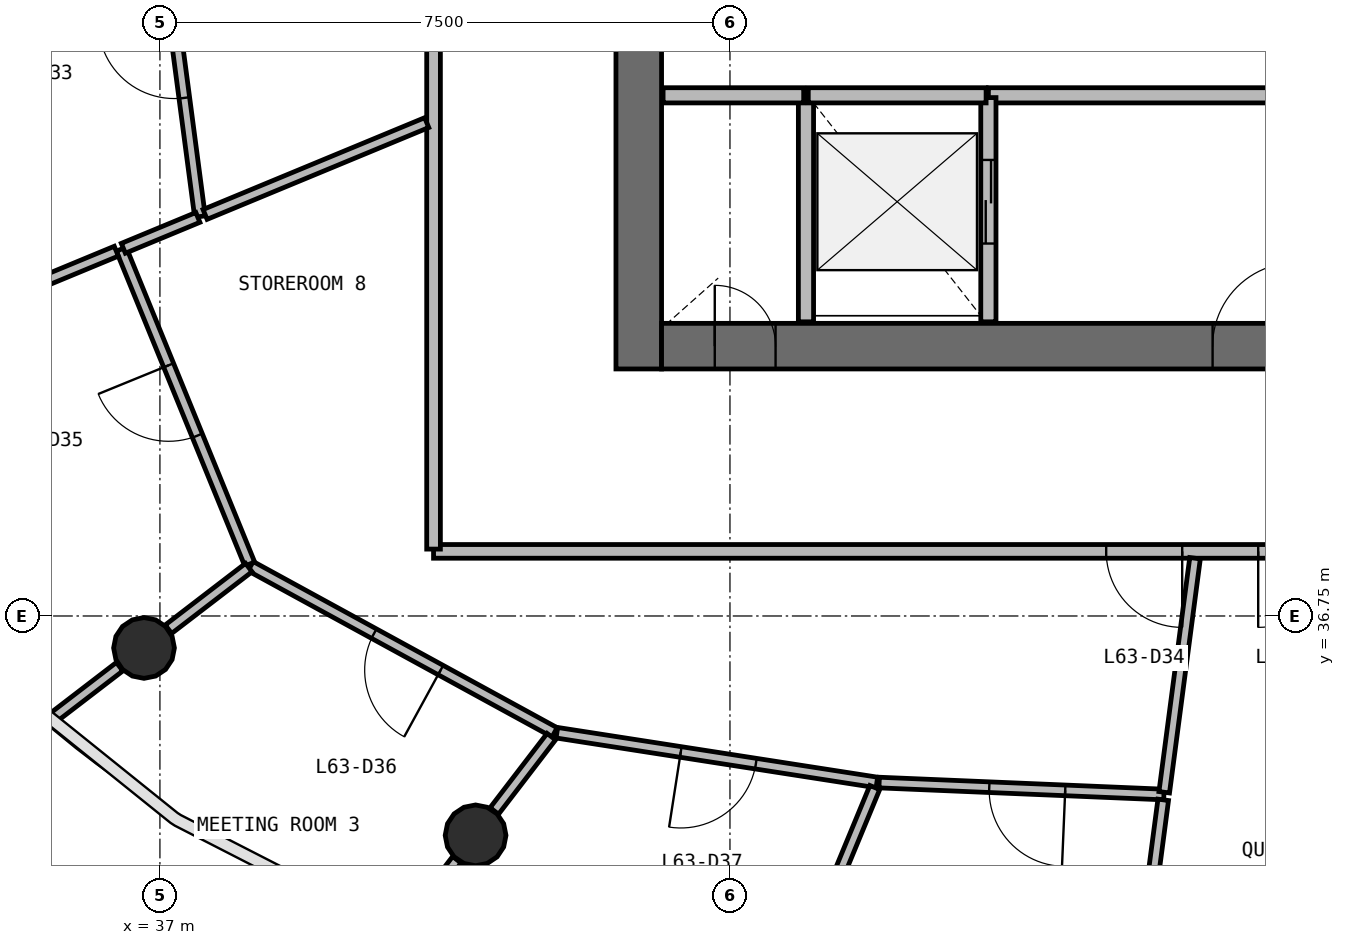
"""IFC4 building model, lengths in metres.
Left out: names, types, materials, properties, quantities, classifications, styles, units other than length and angle.
Written with IfcOpenShell. Run it as: python <this file> out.ifc"""

import sys

from ifc_helpers import new_model, si_unit, direction, frame, frame_2d, origin, origin_2d, place, context, subcontext, project, spatial, rectangle, circle, extrude, source, transform, mapped, element, fill, save


model = new_model("IFC4")
c1 = context("Model", 3, precision=1e-05, world=origin(), true_north=direction((0.0, 1.0)))
c2 = subcontext(c1, "Body", "Model", "MODEL_VIEW")
j1 = project(units=[si_unit("LENGTHUNIT", "METRE"), si_unit("PLANEANGLEUNIT", "RADIAN")], contexts=[c1])
p1 = place(None, origin())
s1 = spatial("IfcSite", under=j1, at=p1, CompositionType="ELEMENT")
p2 = place(p1, origin())
s2 = spatial("IfcBuilding", under=s1, at=p2, CompositionType="ELEMENT")
p3 = place(p2, frame((0.0, 0.0, 257.9)))
s3 = spatial("IfcBuildingStorey", under=s2, at=p3, CompositionType="ELEMENT", Elevation=257.9)
p4 = place(p3, frame((43.3, 56.0, 0.0), z_axis=(0.0, 0.0, 1.0), x_axis=(0.0, -1.0, 0.0)))
e1 = element("IfcWall", 1, at=p4, inside=s3, PredefinedType="SHEAR", context=c2, shape_type="SweptSolid", body=[
    extrude(rectangle(XDim=16.0, YDim=0.6, at=frame_2d((8.0, 0.0))), origin(), (0.0, 0.0, 1.0), 3.9),
])
p5 = place(p4, frame((7.1, 0.0, 0.0)))
e2 = element("IfcOpeningElement", 2, at=p5, cuts=e1, PredefinedType="OPENING", context=c2, shape_type="SweptSolid", body=[
    extrude(rectangle(XDim=1.8, YDim=2.1, at=frame_2d((0.9, 1.05))), frame((0.0, 0.31, 0.0), z_axis=(0.0, -1.0, 0.0), x_axis=(1.0, 0.0, 0.0)), (0.0, 0.0, 1.0), 0.62),
])
p6 = place(p3, frame((43.6, 40.3, 0.0), z_axis=(0.0, 0.0, 1.0), x_axis=(1.0, 0.0, 0.0)))
e3 = element("IfcWall", 3, at=p6, inside=s3, PredefinedType="SHEAR", context=c2, shape_type="SweptSolid", body=[
    extrude(rectangle(XDim=16.8, YDim=0.6, at=frame_2d((8.4, 0.0))), origin(), (0.0, 0.0, 1.0), 3.9),
])
p7 = place(p6, frame((10.3, 0.0, 0.0)))
e4 = element("IfcOpeningElement", 4, at=p7, cuts=e3, PredefinedType="OPENING", context=c2, shape_type="SweptSolid", body=[
    extrude(rectangle(XDim=1.2, YDim=2.1, at=frame_2d((0.6, 1.05))), frame((0.0, 0.31, 0.0), z_axis=(0.0, -1.0, 0.0), x_axis=(1.0, 0.0, 0.0)), (0.0, 0.0, 1.0), 0.62),
])
p8 = place(p6, frame((7.25, 0.0, 0.0)))
e5 = element("IfcOpeningElement", 5, at=p8, cuts=e3, PredefinedType="OPENING", context=c2, shape_type="SweptSolid", body=[
    extrude(rectangle(XDim=1.1, YDim=2.1, at=frame_2d((0.55, 1.05))), frame((0.0, 0.31, 0.0), z_axis=(0.0, -1.0, 0.0), x_axis=(1.0, 0.0, 0.0)), (0.0, 0.0, 1.0), 0.62),
])
p9 = place(p6, frame((0.7, 0.0, 0.0)))
e6 = element("IfcOpeningElement", 6, at=p9, cuts=e3, PredefinedType="OPENING", context=c2, shape_type="SweptSolid", body=[
    extrude(rectangle(XDim=0.8, YDim=2.1, at=frame_2d((0.4, 1.05))), frame((0.0, 0.31, 0.0), z_axis=(0.0, -1.0, 0.0), x_axis=(1.0, 0.0, 0.0)), (0.0, 0.0, 1.0), 0.62),
])
m1 = source(origin(), c2, "Body", "SweptSolid", [
    extrude(circle(Radius=0.4, at=origin_2d()), origin(), (0.0, 0.0, 1.0), 3.9),
])
for number, where, z_axis, x_axis in (
    (7, (36.791, 36.329, 0.0), (0.0, 0.0, 1.0), (1.0, 0.0, 0.0)),
    (8, (41.153, 33.864, 0.0), (0.0, 0.0, 1.0), (1.0, 0.0, 0.0)),
):
    element("IfcColumn", number, at=place(p3, frame(where, z_axis=z_axis, x_axis=x_axis)), inside=s3, PredefinedType="COLUMN", context=c2, shape_type="MappedRepresentation", body=[
        mapped(m1, transform((0.0, 0.0, 0.0), scale=1.0)),
    ])
p10 = place(p3, frame((52.7, 43.6, 0.0), z_axis=(0.0, 0.0, 1.0), x_axis=(-1.0, 0.0, 0.0)))
e9 = element("IfcWall", 9, at=p10, inside=s3, PredefinedType="SOLIDWALL", context=c2, shape_type="SweptSolid", body=[
    extrude(rectangle(XDim=4.8, YDim=0.2, at=frame_2d((2.4, 0.0))), origin(), (0.0, 0.0, 1.0), 3.58),
])
p11 = place(p3, frame((45.5, 43.6, 0.0), z_axis=(0.0, 0.0, 1.0), x_axis=(0.0, -1.0, 0.0)))
e10 = element("IfcWall", 10, at=p11, inside=s3, PredefinedType="SOLIDWALL", context=c2, shape_type="SweptSolid", body=[
    extrude(rectangle(XDim=2.98, YDim=0.2, at=frame_2d((1.49, 0.0))), origin(), (0.0, 0.0, 1.0), 3.58),
])
p12 = place(p3, frame((47.9, 40.62, 0.0), z_axis=(0.0, 0.0, 1.0), x_axis=(0.0, 1.0, 0.0)))
e11 = element("IfcWall", 11, at=p12, inside=s3, PredefinedType="SOLIDWALL", context=c2, shape_type="SweptSolid", body=[
    extrude(rectangle(XDim=2.95, YDim=0.2, at=frame_2d((1.475, 0.0))), origin(), (0.0, 0.0, 1.0), 3.58),
])
p13 = place(p12, frame((1.03, 0.0, 0.0)))
e12 = element("IfcOpeningElement", 12, at=p13, cuts=e11, PredefinedType="OPENING", context=c2, shape_type="SweptSolid", body=[
    extrude(rectangle(XDim=1.1, YDim=2.1, at=frame_2d((0.55, 1.05))), frame((0.0, 0.11, 0.0), z_axis=(0.0, -1.0, 0.0), x_axis=(1.0, 0.0, 0.0)), (0.0, 0.0, 1.0), 0.22),
])
p14 = place(p3, frame((47.87, 43.6, 0.0), z_axis=(0.0, 0.0, 1.0), x_axis=(-1.0, 0.0, 0.0)))
e13 = element("IfcWall", 13, at=p14, inside=s3, PredefinedType="SOLIDWALL", context=c2, shape_type="SweptSolid", body=[
    extrude(rectangle(XDim=2.34, YDim=0.2, at=frame_2d((1.17, 0.0))), origin(), (0.0, 0.0, 1.0), 3.58),
])
p15 = place(p3, frame((45.47, 43.6, 0.0), z_axis=(0.0, 0.0, 1.0), x_axis=(-1.0, 0.0, 0.0)))
e14 = element("IfcWall", 14, at=p15, inside=s3, PredefinedType="SOLIDWALL", context=c2, shape_type="SweptSolid", body=[
    extrude(rectangle(XDim=1.85, YDim=0.2, at=frame_2d((0.925, 0.0))), origin(), (0.0, 0.0, 1.0), 3.58),
])
p16 = place(p3, frame((63.4, 37.6, 0.0), z_axis=(0.0, 0.0, 1.0), x_axis=(-1.0, 0.0, 0.0)))
e15 = element("IfcWall", 15, at=p16, inside=s3, PredefinedType="PARTITIONING", context=c2, shape_type="SweptSolid", body=[
    extrude(rectangle(XDim=22.8, YDim=0.18, at=frame_2d((11.4, 0.0))), origin(), (0.0, 0.0, 1.0), 2.88),
])
p17 = place(p16, frame((12.95, 0.0, 0.0)))
e16 = element("IfcOpeningElement", 16, at=p17, cuts=e15, PredefinedType="OPENING", context=c2, shape_type="SweptSolid", body=[
    extrude(rectangle(XDim=1.0, YDim=2.1, at=frame_2d((0.5, 1.05))), frame((0.0, 0.1, 0.0), z_axis=(0.0, -1.0, 0.0), x_axis=(1.0, 0.0, 0.0)), (0.0, 0.0, 1.0), 0.2),
])
p18 = place(p16, frame((10.95, 0.0, 0.0)))
e17 = element("IfcOpeningElement", 17, at=p18, cuts=e15, PredefinedType="OPENING", context=c2, shape_type="SweptSolid", body=[
    extrude(rectangle(XDim=1.0, YDim=2.1, at=frame_2d((0.5, 1.05))), frame((0.0, 0.1, 0.0), z_axis=(0.0, -1.0, 0.0), x_axis=(1.0, 0.0, 0.0)), (0.0, 0.0, 1.0), 0.2),
])
p19 = place(p16, frame((8.75, 0.0, 0.0)))
e18 = element("IfcOpeningElement", 18, at=p19, cuts=e15, PredefinedType="OPENING", context=c2, shape_type="SweptSolid", body=[
    extrude(rectangle(XDim=1.0, YDim=2.1, at=frame_2d((0.5, 1.05))), frame((0.0, 0.1, 0.0), z_axis=(0.0, -1.0, 0.0), x_axis=(1.0, 0.0, 0.0)), (0.0, 0.0, 1.0), 0.2),
])
p20 = place(p3, frame((40.6, 37.63, 0.0), z_axis=(0.0, 0.0, 1.0), x_axis=(0.0, 1.0, 0.0)))
e19 = element("IfcWall", 19, at=p20, inside=s3, PredefinedType="PARTITIONING", context=c2, shape_type="SweptSolid", body=[
    extrude(rectangle(XDim=20.74, YDim=0.18, at=frame_2d((10.37, 0.0))), origin(), (0.0, 0.0, 1.0), 2.88),
])
p21 = place(p20, frame((12.09, 0.0, 0.0)))
e20 = element("IfcOpeningElement", 20, at=p21, cuts=e19, PredefinedType="OPENING", context=c2, shape_type="SweptSolid", body=[
    extrude(rectangle(XDim=1.0, YDim=2.1, at=frame_2d((0.5, 1.05))), frame((0.0, 0.1, 0.0), z_axis=(0.0, -1.0, 0.0), x_axis=(1.0, 0.0, 0.0)), (0.0, 0.0, 1.0), 0.2),
])
p22 = place(p20, frame((9.89, 0.0, 0.0)))
e21 = element("IfcOpeningElement", 21, at=p22, cuts=e19, PredefinedType="OPENING", context=c2, shape_type="SweptSolid", body=[
    extrude(rectangle(XDim=1.0, YDim=2.1, at=frame_2d((0.5, 1.05))), frame((0.0, 0.1, 0.0), z_axis=(0.0, -1.0, 0.0), x_axis=(1.0, 0.0, 0.0)), (0.0, 0.0, 1.0), 0.2),
])
p23 = place(p3, frame((42.193, 35.219, 0.0), z_axis=(0.0, 0.0, 1.0), x_axis=(-0.877448984614, 0.479669969249, 0.0)))
e22 = element("IfcWall", 22, at=p23, inside=s3, PredefinedType="PARTITIONING", context=c2, shape_type="SweptSolid", body=[
    extrude(rectangle(XDim=4.558, YDim=0.14, at=frame_2d((2.279, 0.0))), origin(), (0.0, 0.0, 1.0), 2.88),
])
p24 = place(p23, frame((1.708, 0.0, 0.0)))
e23 = element("IfcOpeningElement", 23, at=p24, cuts=e22, PredefinedType="OPENING", context=c2, shape_type="SweptSolid", body=[
    extrude(rectangle(XDim=1.0, YDim=2.1, at=frame_2d((0.5, 1.05))), frame((0.0, 0.08, 0.0), z_axis=(0.0, -1.0, 0.0), x_axis=(1.0, 0.0, 0.0)), (0.0, 0.0, 1.0), 0.16),
])
p25 = place(p3, frame((38.182, 37.433, 0.0), z_axis=(0.0, 0.0, 1.0), x_axis=(-0.377844499275, 0.925869069776, 0.0)))
e24 = element("IfcWall", 24, at=p25, inside=s3, PredefinedType="PARTITIONING", context=c2, shape_type="SweptSolid", body=[
    extrude(rectangle(XDim=4.475, YDim=0.14, at=frame_2d((2.237, 0.0))), origin(), (0.0, 0.0, 1.0), 2.88),
])
p26 = place(p25, frame((1.824, 0.0, 0.0)))
e25 = element("IfcOpeningElement", 25, at=p26, cuts=e24, PredefinedType="OPENING", context=c2, shape_type="SweptSolid", body=[
    extrude(rectangle(XDim=1.0, YDim=2.1, at=frame_2d((0.5, 1.05))), frame((0.0, 0.08, 0.0), z_axis=(0.0, -1.0, 0.0), x_axis=(1.0, 0.0, 0.0)), (0.0, 0.0, 1.0), 0.16),
])
p27 = place(p3, frame((46.433, 34.56, 0.0), z_axis=(0.0, 0.0, 1.0), x_axis=(-0.988131354716, 0.153611281572, 0.0)))
e26 = element("IfcWall", 26, at=p27, inside=s3, PredefinedType="PARTITIONING", context=c2, shape_type="SweptSolid", body=[
    extrude(rectangle(XDim=4.261, YDim=0.14, at=frame_2d((2.13, 0.0))), origin(), (0.0, 0.0, 1.0), 2.88),
])
p28 = place(p27, frame((1.611, 0.0, 0.0)))
e27 = element("IfcOpeningElement", 27, at=p28, cuts=e26, PredefinedType="OPENING", context=c2, shape_type="SweptSolid", body=[
    extrude(rectangle(XDim=1.0, YDim=2.1, at=frame_2d((0.5, 1.05))), frame((0.0, 0.08, 0.0), z_axis=(0.0, -1.0, 0.0), x_axis=(1.0, 0.0, 0.0)), (0.0, 0.0, 1.0), 0.16),
])
p29 = place(p3, frame((37.527, 42.005, 0.0), z_axis=(0.0, 0.0, 1.0), x_axis=(-0.130975494037, 0.99138560609, 0.0)))
e28 = element("IfcWall", 28, at=p29, inside=s3, PredefinedType="PARTITIONING", context=c2, shape_type="SweptSolid", body=[
    extrude(rectangle(XDim=4.024, YDim=0.14, at=frame_2d((2.012, 0.0))), origin(), (0.0, 0.0, 1.0), 2.88),
])
p30 = place(p29, frame((1.574, 0.0, 0.0)))
e29 = element("IfcOpeningElement", 29, at=p30, cuts=e28, PredefinedType="OPENING", context=c2, shape_type="SweptSolid", body=[
    extrude(rectangle(XDim=1.0, YDim=2.1, at=frame_2d((0.5, 1.05))), frame((0.0, 0.08, 0.0), z_axis=(0.0, -1.0, 0.0), x_axis=(1.0, 0.0, 0.0)), (0.0, 0.0, 1.0), 0.16),
])
p31 = place(p3, frame((50.21, 34.401, 0.0), z_axis=(0.0, 0.0, 1.0), x_axis=(-0.999118002039, 0.041990689471, 0.0)))
e30 = element("IfcWall", 30, at=p31, inside=s3, PredefinedType="PARTITIONING", context=c2, shape_type="SweptSolid", body=[
    extrude(rectangle(XDim=3.75, YDim=0.14, at=frame_2d((1.875, 0.0))), origin(), (0.0, 0.0, 1.0), 2.88),
])
p32 = place(p31, frame((1.3, 0.0, 0.0)))
e31 = element("IfcOpeningElement", 31, at=p32, cuts=e30, PredefinedType="OPENING", context=c2, shape_type="SweptSolid", body=[
    extrude(rectangle(XDim=1.0, YDim=2.1, at=frame_2d((0.5, 1.05))), frame((0.0, 0.08, 0.0), z_axis=(0.0, -1.0, 0.0), x_axis=(1.0, 0.0, 0.0)), (0.0, 0.0, 1.0), 0.16),
])
p33 = place(p3, frame((40.51, 43.241, 0.0), z_axis=(0.0, 0.0, 1.0), x_axis=(-0.923862215035, -0.382725237776, 0.0)))
e32 = element("IfcWall", 32, at=p33, inside=s3, PredefinedType="PARTITIONING", context=c2, shape_type="SweptSolid", body=[
    extrude(rectangle(XDim=3.156, YDim=0.14, at=frame_2d((1.578, 0.0))), origin(), (0.0, 0.0, 1.0), 2.88),
])
p34 = place(p3, frame((50.619, 37.51, 0.0), z_axis=(0.0, 0.0, 1.0), x_axis=(-0.130495182838, -0.991448943343, 0.0)))
e33 = element("IfcWall", 33, at=p34, inside=s3, PredefinedType="PARTITIONING", context=c2, shape_type="SweptSolid", body=[
    extrude(rectangle(XDim=3.106, YDim=0.14, at=frame_2d((1.553, 0.0))), origin(), (0.0, 0.0, 1.0), 2.88),
])
p35 = place(p3, frame((36.426, 41.549, 0.0), z_axis=(0.0, 0.0, 1.0), x_axis=(-0.923867061942, -0.382713537595, 0.0)))
e34 = element("IfcWall", 34, at=p35, inside=s3, PredefinedType="PARTITIONING", context=c2, shape_type="SweptSolid", body=[
    extrude(rectangle(XDim=3.0, YDim=0.14, at=frame_2d((1.5, 0.0))), origin(), (0.0, 0.0, 1.0), 2.88),
])
p36 = place(p3, frame((50.2, 34.331, 0.0), z_axis=(0.0, 0.0, 1.0), x_axis=(-0.13054119413, -0.991442886219, 0.0)))
e35 = element("IfcWall", 35, at=p36, inside=s3, PredefinedType="PARTITIONING", context=c2, shape_type="SweptSolid", body=[
    extrude(rectangle(XDim=1.676, YDim=0.14, at=frame_2d((0.838, 0.0))), origin(), (0.0, 0.0, 1.0), 2.88),
])
p37 = place(p3, frame((46.405, 34.493, 0.0), z_axis=(0.0, 0.0, 1.0), x_axis=(-0.382705531501, -0.92387037844, 0.0)))
e36 = element("IfcWall", 36, at=p37, inside=s3, PredefinedType="PARTITIONING", context=c2, shape_type="SweptSolid", body=[
    extrude(rectangle(XDim=1.625, YDim=0.14, at=frame_2d((0.813, 0.0))), origin(), (0.0, 0.0, 1.0), 2.88),
])
p38 = place(p3, frame((38.169, 37.387, 0.0), z_axis=(0.0, 0.0, 1.0), x_axis=(-0.793358692504, -0.608754453805, 0.0)))
e37 = element("IfcWall", 37, at=p38, inside=s3, PredefinedType="PARTITIONING", context=c2, shape_type="SweptSolid", body=[
    extrude(rectangle(XDim=1.333, YDim=0.14, at=frame_2d((0.667, 0.0))), origin(), (0.0, 0.0, 1.0), 2.88),
])
p39 = place(p3, frame((42.15, 35.163, 0.0), z_axis=(0.0, 0.0, 1.0), x_axis=(-0.608839083006, -0.793293748245, 0.0)))
e38 = element("IfcWall", 38, at=p39, inside=s3, PredefinedType="PARTITIONING", context=c2, shape_type="SweptSolid", body=[
    extrude(rectangle(XDim=1.232, YDim=0.14, at=frame_2d((0.616, 0.0))), origin(), (0.0, 0.0, 1.0), 2.88),
])
p40 = place(p3, frame((40.907, 33.543, 0.0), z_axis=(0.0, 0.0, 1.0), x_axis=(-0.60864680101, -0.793441284293, 0.0)))
e39 = element("IfcWall", 39, at=p40, inside=s3, PredefinedType="PARTITIONING", context=c2, shape_type="SweptSolid", body=[
    extrude(rectangle(XDim=1.143, YDim=0.14, at=frame_2d((0.571, 0.0))), origin(), (0.0, 0.0, 1.0), 2.88),
])
p41 = place(p3, frame((37.499, 41.994, 0.0), z_axis=(0.0, 0.0, 1.0), x_axis=(-0.923837370253, -0.382785205205, 0.0)))
e40 = element("IfcWall", 40, at=p41, inside=s3, PredefinedType="PARTITIONING", context=c2, shape_type="SweptSolid", body=[
    extrude(rectangle(XDim=1.061, YDim=0.14, at=frame_2d((0.531, 0.0))), origin(), (0.0, 0.0, 1.0), 2.88),
])
p42 = place(p3, frame((36.469, 36.083, 0.0), z_axis=(0.0, 0.0, 1.0), x_axis=(-0.793297066138, -0.608834759895, 0.0)))
e41 = element("IfcWall", 41, at=p42, inside=s3, PredefinedType="PARTITIONING", context=c2, shape_type="SweptSolid", body=[
    extrude(rectangle(XDim=1.118, YDim=0.14, at=frame_2d((0.559, 0.0))), origin(), (0.0, 0.0, 1.0), 2.88),
])
m2 = source(origin(), c2, "Body", "SweptSolid", [
    extrude(rectangle(XDim=1.1, YDim=2.1, at=frame_2d((0.55, 1.05))), frame((0.0, 0.025, 0.0), z_axis=(0.0, -1.0, 0.0), x_axis=(1.0, 0.0, 0.0)), (0.0, 0.0, 1.0), 0.05),
])
p43 = place(p13, origin())
e42 = element("IfcDoor", 42, at=p43, inside=s3, OperationType="DOUBLE_DOOR_SLIDING", PredefinedType="USERDEFINED", context=c2, shape_type="MappedRepresentation", body=[
    mapped(m2, transform((0.0, 0.0, 0.0), scale=1.0)),
])
fill(e12, e42)
m3 = source(origin(), c2, "Body", "SweptSolid", [
    extrude(rectangle(XDim=1.1, YDim=2.1, at=frame_2d((0.55, 1.05))), frame((0.0, 0.025, 0.0), z_axis=(0.0, -1.0, 0.0), x_axis=(1.0, 0.0, 0.0)), (0.0, 0.0, 1.0), 0.05),
])
p44 = place(p8, origin())
e43 = element("IfcDoor", 43, at=p44, inside=s3, OperationType="SINGLE_SWING_RIGHT", PredefinedType="DOOR", context=c2, shape_type="MappedRepresentation", body=[
    mapped(m3, transform((0.0, 0.0, 0.0), scale=1.0)),
])
fill(e5, e43)
m4 = source(origin(), c2, "Body", "SweptSolid", [
    extrude(rectangle(XDim=0.8, YDim=2.1, at=frame_2d((0.4, 1.05))), frame((0.0, 0.025, 0.0), z_axis=(0.0, -1.0, 0.0), x_axis=(1.0, 0.0, 0.0)), (0.0, 0.0, 1.0), 0.05),
])
p45 = place(p9, origin())
e44 = element("IfcDoor", 44, at=p45, inside=s3, OperationType="SINGLE_SWING_LEFT", PredefinedType="DOOR", context=c2, shape_type="MappedRepresentation", body=[
    mapped(m4, transform((0.0, 0.0, 0.0), scale=1.0)),
])
fill(e6, e44)
m5 = source(origin(), c2, "Body", "SweptSolid", [
    extrude(rectangle(XDim=1.0, YDim=2.1, at=frame_2d((0.5, 1.05))), frame((0.0, 0.025, 0.0), z_axis=(0.0, -1.0, 0.0), x_axis=(1.0, 0.0, 0.0)), (0.0, 0.0, 1.0), 0.05),
])
p46 = place(p30, origin())
e45 = element("IfcDoor", 45, at=p46, inside=s3, OperationType="SINGLE_SWING_RIGHT", PredefinedType="DOOR", context=c2, shape_type="MappedRepresentation", body=[
    mapped(m5, transform((0.0, 0.0, 0.0), scale=1.0)),
])
fill(e29, e45)
p47 = place(p17, origin())
e46 = element("IfcDoor", 46, at=p47, inside=s3, OperationType="SINGLE_SWING_LEFT", PredefinedType="DOOR", context=c2, shape_type="MappedRepresentation", body=[
    mapped(m5, transform((0.0, 0.0, 0.0), scale=1.0)),
])
fill(e16, e46)
p48 = place(p26, origin())
e47 = element("IfcDoor", 47, at=p48, inside=s3, OperationType="SINGLE_SWING_RIGHT", PredefinedType="DOOR", context=c2, shape_type="MappedRepresentation", body=[
    mapped(m5, transform((0.0, 0.0, 0.0), scale=1.0)),
])
fill(e25, e47)
p49 = place(p24, origin())
e48 = element("IfcDoor", 48, at=p49, inside=s3, OperationType="SINGLE_SWING_LEFT", PredefinedType="DOOR", context=c2, shape_type="MappedRepresentation", body=[
    mapped(m5, transform((0.0, 0.0, 0.0), scale=1.0)),
])
fill(e23, e48)
p50 = place(p28, origin())
e49 = element("IfcDoor", 49, at=p50, inside=s3, OperationType="SINGLE_SWING_RIGHT", PredefinedType="DOOR", context=c2, shape_type="MappedRepresentation", body=[
    mapped(m5, transform((0.0, 0.0, 0.0), scale=1.0)),
])
fill(e27, e49)
p51 = place(p32, origin())
e50 = element("IfcDoor", 50, at=p51, inside=s3, OperationType="SINGLE_SWING_LEFT", PredefinedType="DOOR", context=c2, shape_type="MappedRepresentation", body=[
    mapped(m5, transform((0.0, 0.0, 0.0), scale=1.0)),
])
fill(e31, e50)
p52 = place(p18, origin())
e51 = element("IfcDoor", 51, at=p52, inside=s3, OperationType="SINGLE_SWING_RIGHT", PredefinedType="DOOR", context=c2, shape_type="MappedRepresentation", body=[
    mapped(m5, transform((0.0, 0.0, 0.0), scale=1.0)),
])
fill(e17, e51)
save(model, sys.argv[1])
